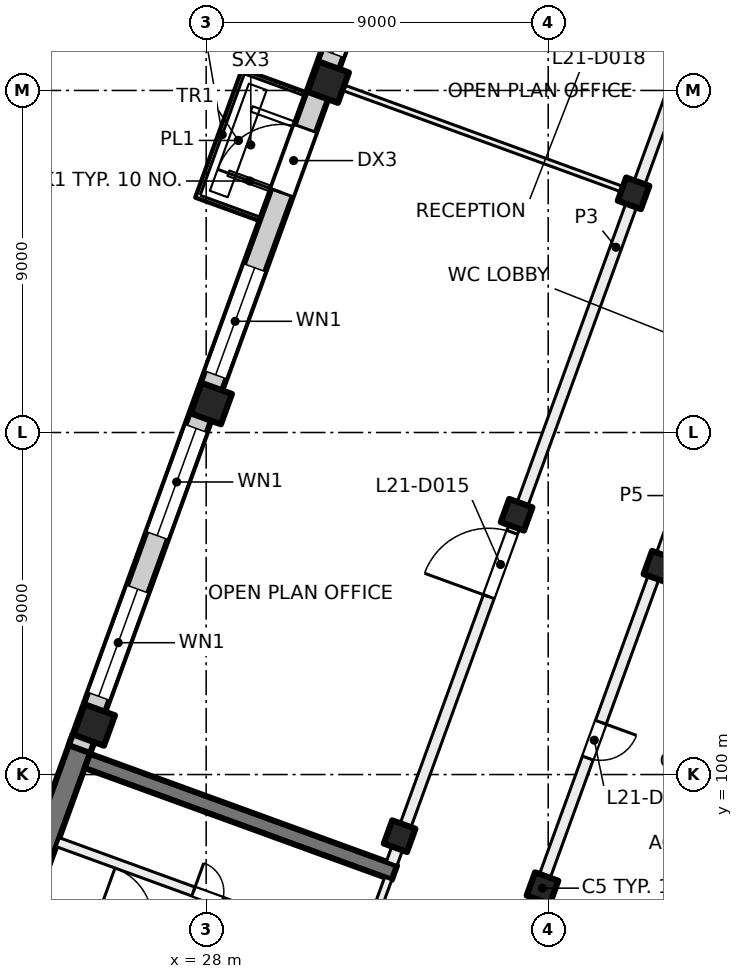
"""IFC4 building model, lengths in metres.
Left out: names, types, materials, properties, quantities, classifications, styles, units other than length and angle.
Written with IfcOpenShell. Run it as: python <this file> out.ifc"""

import sys

from ifc_helpers import new_model, si_unit, direction, frame, frame_2d, origin, origin_2d, place, context, subcontext, project, spatial, rectangle, extrude, element, fill, save


model = new_model("IFC4")
c1 = context("Model", 3, precision=1e-05, world=origin(), true_north=direction((0.0, 1.0)))
c2 = subcontext(c1, "Body", "Model", "MODEL_VIEW")
j1 = project(units=[si_unit("LENGTHUNIT", "METRE"), si_unit("PLANEANGLEUNIT", "RADIAN")], contexts=[c1])
p1 = place(None, origin())
s1 = spatial("IfcSite", under=j1, at=p1, CompositionType="ELEMENT")
p2 = place(p1, origin())
s2 = spatial("IfcBuilding", under=s1, at=p2, CompositionType="ELEMENT")
p3 = place(p2, frame((0.0, 0.0, 93.0)))
s3 = spatial("IfcBuildingStorey", under=s2, at=p3, CompositionType="ELEMENT", Elevation=93.0)
for number, where, z_axis, x_axis in (
    (1, (39.927, 105.468, 0.0), (0.0, 0.0, 1.0), (-0.342, -0.94, 0.0)),
    (2, (36.849, 97.011, 0.0), (0.0, 0.0, 1.0), (-0.342, -0.94, 0.0)),
    (3, (39.247, 115.293, 0.0), (0.0, 0.0, 1.0), (-0.342, -0.94, 0.0)),
    (4, (36.169, 106.836, 0.0), (0.0, 0.0, 1.0), (-0.342, -0.94, 0.0)),
    (5, (33.091, 98.379, 0.0), (0.0, 0.0, 1.0), (-0.342, -0.94, 0.0)),
):
    element("IfcColumn", number, at=place(p3, frame(where, z_axis=z_axis, x_axis=x_axis)), inside=s3, PredefinedType="COLUMN", context=c2, shape_type="SweptSolid", body=[
        extrude(rectangle(XDim=0.65, YDim=0.65, at=origin_2d()), origin(), (0.0, 0.0, 1.0), 4.0),
    ])
for number, where, z_axis, x_axis in (
    (6, (31.212, 118.218, 0.0), (0.0, 0.0, 1.0), (-0.342, -0.94, 0.0)),
    (7, (28.134, 109.76, 0.0), (0.0, 0.0, 1.0), (-0.342, -0.94, 0.0)),
    (8, (25.056, 101.303, 0.0), (0.0, 0.0, 1.0), (-0.342, -0.94, 0.0)),
):
    element("IfcColumn", number, at=place(p3, frame(where, z_axis=z_axis, x_axis=x_axis)), inside=s3, PredefinedType="COLUMN", context=c2, shape_type="SweptSolid", body=[
        extrude(rectangle(XDim=0.85, YDim=0.85, at=origin_2d()), origin(), (0.0, 0.0, 1.0), 4.0),
    ])
p4 = place(p3, frame((21.717, 92.568, 0.0), z_axis=(0.0, 0.0, 1.0), x_axis=(0.342017595281, 0.939693548195, 0.0)))
e9 = element("IfcWall", 9, at=p4, inside=s3, PredefinedType="SHEAR", context=c2, shape_type="SweptSolid", body=[
    extrude(rectangle(XDim=8.925, YDim=0.6, at=frame_2d((4.462, 0.0))), origin(), (0.0, 0.0, 1.0), 4.0),
])
p5 = place(p3, frame((32.953, 97.418, 0.0), z_axis=(0.0, 0.0, 1.0), x_axis=(-0.93969060187, 0.342025690201, 0.0)))
e10 = element("IfcWall", 10, at=p5, inside=s3, PredefinedType="SHEAR", context=c2, shape_type="SweptSolid", body=[
    extrude(rectangle(XDim=8.6, YDim=0.4, at=frame_2d((4.3, 0.0))), origin(), (0.0, 0.0, 1.0), 4.0),
])
p6 = place(p3, frame((24.666, 100.669, 0.0), z_axis=(0.0, 0.0, 1.0), x_axis=(0.34201964167, 0.939692803373, 0.0)))
e11 = element("IfcWall", 11, at=p6, inside=s3, PredefinedType="SOLIDWALL", context=c2, shape_type="SweptSolid", body=[
    extrude(rectangle(XDim=32.884, YDim=0.6, at=frame_2d((16.442, 0.0))), origin(), (0.0, 0.0, 1.0), 3.625),
])
p7 = place(p6, frame((1.48, 0.0, 0.9)))
e12 = element("IfcOpeningElement", 12, at=p7, cuts=e11, PredefinedType="OPENING", context=c2, shape_type="SweptSolid", body=[
    extrude(rectangle(XDim=3.0, YDim=2.4, at=frame_2d((1.5, 1.2))), frame((0.0, 0.31, 0.0), z_axis=(0.0, -1.0, 0.0), x_axis=(1.0, 0.0, 0.0)), (0.0, 0.0, 1.0), 0.62),
])
p8 = place(p6, frame((5.98, 0.0, 0.9)))
e13 = element("IfcOpeningElement", 13, at=p8, cuts=e11, PredefinedType="OPENING", context=c2, shape_type="SweptSolid", body=[
    extrude(rectangle(XDim=3.0, YDim=2.4, at=frame_2d((1.5, 1.2))), frame((0.0, 0.31, 0.0), z_axis=(0.0, -1.0, 0.0), x_axis=(1.0, 0.0, 0.0)), (0.0, 0.0, 1.0), 0.62),
])
p9 = place(p6, frame((10.48, 0.0, 0.9)))
e14 = element("IfcOpeningElement", 14, at=p9, cuts=e11, PredefinedType="OPENING", context=c2, shape_type="SweptSolid", body=[
    extrude(rectangle(XDim=3.0, YDim=2.4, at=frame_2d((1.5, 1.2))), frame((0.0, 0.31, 0.0), z_axis=(0.0, -1.0, 0.0), x_axis=(1.0, 0.0, 0.0)), (0.0, 0.0, 1.0), 0.62),
])
p10 = place(p6, frame((15.58, 0.0, 0.0)))
e15 = element("IfcOpeningElement", 15, at=p10, cuts=e11, PredefinedType="OPENING", context=c2, shape_type="SweptSolid", body=[
    extrude(rectangle(XDim=1.8, YDim=2.4, at=frame_2d((0.9, 1.2))), frame((0.0, 0.31, 0.0), z_axis=(0.0, -1.0, 0.0), x_axis=(1.0, 0.0, 0.0)), (0.0, 0.0, 1.0), 0.62),
])
p11 = place(p6, frame((19.48, 0.0, 0.9)))
e16 = element("IfcOpeningElement", 16, at=p11, cuts=e11, PredefinedType="OPENING", context=c2, shape_type="SweptSolid", body=[
    extrude(rectangle(XDim=3.0, YDim=2.4, at=frame_2d((1.5, 1.2))), frame((0.0, 0.31, 0.0), z_axis=(0.0, -1.0, 0.0), x_axis=(1.0, 0.0, 0.0)), (0.0, 0.0, 1.0), 0.62),
])
p12 = place(p6, frame((23.98, 0.0, 0.9)))
e17 = element("IfcOpeningElement", 17, at=p12, cuts=e11, PredefinedType="OPENING", context=c2, shape_type="SweptSolid", body=[
    extrude(rectangle(XDim=3.0, YDim=2.4, at=frame_2d((1.5, 1.2))), frame((0.0, 0.31, 0.0), z_axis=(0.0, -1.0, 0.0), x_axis=(1.0, 0.0, 0.0)), (0.0, 0.0, 1.0), 0.62),
])
p13 = place(p6, frame((29.08, 0.0, 0.0)))
e18 = element("IfcOpeningElement", 18, at=p13, cuts=e11, PredefinedType="OPENING", context=c2, shape_type="SweptSolid", body=[
    extrude(rectangle(XDim=1.8, YDim=2.4, at=frame_2d((0.9, 1.2))), frame((0.0, 0.31, 0.0), z_axis=(0.0, -1.0, 0.0), x_axis=(1.0, 0.0, 0.0)), (0.0, 0.0, 1.0), 0.62),
])
p14 = place(p3, frame((31.491, 93.693, 0.0), z_axis=(0.0, 0.0, 1.0), x_axis=(0.341995824804, 0.939701471648, 0.0)))
e19 = element("IfcWall", 19, at=p14, inside=s3, PredefinedType="PARTITIONING", context=c2, shape_type="SweptSolid", body=[
    extrude(rectangle(XDim=3.8, YDim=0.2, at=frame_2d((1.9, 0.0))), origin(), (0.0, 0.0, 1.0), 3.625),
])
p15 = place(p14, frame((0.3, 0.0, 0.0)))
e20 = element("IfcOpeningElement", 20, at=p15, cuts=e19, PredefinedType="OPENING", context=c2, shape_type="SweptSolid", body=[
    extrude(rectangle(XDim=1.2, YDim=2.1, at=frame_2d((0.6, 1.05))), frame((0.0, 0.11, 0.0), z_axis=(0.0, -1.0, 0.0), x_axis=(1.0, 0.0, 0.0)), (0.0, 0.0, 1.0), 0.22),
])
p16 = place(p3, frame((23.538, 96.694, 0.0), z_axis=(0.0, 0.0, 1.0), x_axis=(0.939691552312, -0.342023078919, 0.0)))
e21 = element("IfcWall", 21, at=p16, inside=s3, PredefinedType="PARTITIONING", context=c2, shape_type="SweptSolid", body=[
    extrude(rectangle(XDim=8.4, YDim=0.2, at=frame_2d((4.2, 0.0))), origin(), (0.0, 0.0, 1.0), 3.625),
])
p17 = place(p16, frame((1.65, 0.0, 0.0)))
e22 = element("IfcOpeningElement", 22, at=p17, cuts=e21, PredefinedType="OPENING", context=c2, shape_type="SweptSolid", body=[
    extrude(rectangle(XDim=1.5, YDim=2.1, at=frame_2d((0.75, 1.05))), frame((0.0, 0.11, 0.0), z_axis=(0.0, -1.0, 0.0), x_axis=(1.0, 0.0, 0.0)), (0.0, 0.0, 1.0), 0.22),
])
p18 = place(p3, frame((24.094, 98.221, 0.0), z_axis=(0.0, 0.0, 1.0), x_axis=(0.939691552312, -0.342023078919, 0.0)))
e23 = element("IfcWall", 23, at=p18, inside=s3, PredefinedType="PARTITIONING", context=c2, shape_type="SweptSolid", body=[
    extrude(rectangle(XDim=8.4, YDim=0.25, at=frame_2d((4.2, 0.0))), origin(), (0.0, 0.0, 1.0), 3.625),
])
p19 = place(p18, frame((3.8, 0.0, 0.0)))
e24 = element("IfcOpeningElement", 24, at=p19, cuts=e23, PredefinedType="OPENING", context=c2, shape_type="SweptSolid", body=[
    extrude(rectangle(XDim=0.8, YDim=2.1, at=frame_2d((0.4, 1.05))), frame((0.0, 0.135, 0.0), z_axis=(0.0, -1.0, 0.0), x_axis=(1.0, 0.0, 0.0)), (0.0, 0.0, 1.0), 0.27),
])
p20 = place(p3, frame((31.353, 118.166, 0.0), z_axis=(0.0, 0.0, 1.0), x_axis=(0.939687752599, -0.342033518263, 0.0)))
e25 = element("IfcWall", 25, at=p20, inside=s3, PredefinedType="PARTITIONING", context=c2, shape_type="SweptSolid", body=[
    extrude(rectangle(XDim=8.301, YDim=0.15, at=frame_2d((4.15, 0.0))), origin(), (0.0, 0.0, 1.0), 3.625),
])
p21 = place(p3, frame((32.881, 97.657, 0.0), z_axis=(0.0, 0.0, 1.0), x_axis=(0.342017360004, 0.939693633828, 0.0)))
e26 = element("IfcWall", 26, at=p21, inside=s3, PredefinedType="PARTITIONING", context=c2, shape_type="SweptSolid", body=[
    extrude(rectangle(XDim=34.516, YDim=0.3, at=frame_2d((17.258, 0.0))), origin(), (0.0, 0.0, 1.0), 3.625),
])
p22 = place(p21, frame((7.475, 0.0, 0.0)))
e27 = element("IfcOpeningElement", 27, at=p22, cuts=e26, PredefinedType="OPENING", context=c2, shape_type="SweptSolid", body=[
    extrude(rectangle(XDim=1.8, YDim=2.1, at=frame_2d((0.9, 1.05))), frame((0.0, 0.16, 0.0), z_axis=(0.0, -1.0, 0.0), x_axis=(1.0, 0.0, 0.0)), (0.0, 0.0, 1.0), 0.32),
])
p23 = place(p21, frame((25.0, 0.0, 0.0)))
e28 = element("IfcOpeningElement", 28, at=p23, cuts=e26, PredefinedType="OPENING", context=c2, shape_type="SweptSolid", body=[
    extrude(rectangle(XDim=1.0, YDim=2.1, at=frame_2d((0.5, 1.05))), frame((0.0, 0.16, 0.0), z_axis=(0.0, -1.0, 0.0), x_axis=(1.0, 0.0, 0.0)), (0.0, 0.0, 1.0), 0.32),
])
p24 = place(p21, frame((29.779, 0.0, 0.0)))
e29 = element("IfcOpeningElement", 29, at=p24, cuts=e26, PredefinedType="OPENING", context=c2, shape_type="SweptSolid", body=[
    extrude(rectangle(XDim=1.8, YDim=2.1, at=frame_2d((0.9, 1.05))), frame((0.0, 0.16, 0.0), z_axis=(0.0, -1.0, 0.0), x_axis=(1.0, 0.0, 0.0)), (0.0, 0.0, 1.0), 0.32),
])
p25 = place(p3, frame((40.021, 105.434, 0.0), z_axis=(0.0, 0.0, 1.0), x_axis=(0.939564838351, -0.342371018829, 0.0)))
e30 = element("IfcWall", 30, at=p25, inside=s3, PredefinedType="PARTITIONING", context=c2, shape_type="SweptSolid", body=[
    extrude(rectangle(XDim=2.591, YDim=0.125, at=frame_2d((1.295, 0.0))), origin(), (0.0, 0.0, 1.0), 3.625),
])
p26 = place(p3, frame((47.314, 125.909, 0.0), z_axis=(0.0, 0.0, 1.0), x_axis=(-0.342010770371, -0.939696032209, 0.0)))
e31 = element("IfcWall", 31, at=p26, inside=s3, PredefinedType="PARTITIONING", context=c2, shape_type="SweptSolid", body=[
    extrude(rectangle(XDim=31.485, YDim=0.3, at=frame_2d((15.742, 0.0))), origin(), (0.0, 0.0, 1.0), 3.625),
])
p27 = place(p26, frame((26.11, 0.0, 0.0)))
e32 = element("IfcOpeningElement", 32, at=p27, cuts=e31, PredefinedType="OPENING", context=c2, shape_type="SweptSolid", body=[
    extrude(rectangle(XDim=1.0, YDim=2.1, at=frame_2d((0.5, 1.05))), frame((0.0, 0.16, 0.0), z_axis=(0.0, -1.0, 0.0), x_axis=(1.0, 0.0, 0.0)), (0.0, 0.0, 1.0), 0.32),
])
p28 = place(p26, frame((15.485, 0.0, 0.0)))
e33 = element("IfcOpeningElement", 33, at=p28, cuts=e31, PredefinedType="OPENING", context=c2, shape_type="SweptSolid", body=[
    extrude(rectangle(XDim=1.0, YDim=2.1, at=frame_2d((0.5, 1.05))), frame((0.0, 0.16, 0.0), z_axis=(0.0, -1.0, 0.0), x_axis=(1.0, 0.0, 0.0)), (0.0, 0.0, 1.0), 0.32),
])
p29 = place(p26, frame((9.985, 0.0, 0.0)))
e34 = element("IfcOpeningElement", 34, at=p29, cuts=e31, PredefinedType="OPENING", context=c2, shape_type="SweptSolid", body=[
    extrude(rectangle(XDim=1.0, YDim=2.1, at=frame_2d((0.5, 1.05))), frame((0.0, 0.16, 0.0), z_axis=(0.0, -1.0, 0.0), x_axis=(1.0, 0.0, 0.0)), (0.0, 0.0, 1.0), 0.32),
])
p30 = place(p26, frame((5.484, 0.0, 0.0)))
e35 = element("IfcOpeningElement", 35, at=p30, cuts=e31, PredefinedType="OPENING", context=c2, shape_type="SweptSolid", body=[
    extrude(rectangle(XDim=1.0, YDim=2.1, at=frame_2d((0.5, 1.05))), frame((0.0, 0.16, 0.0), z_axis=(0.0, -1.0, 0.0), x_axis=(1.0, 0.0, 0.0)), (0.0, 0.0, 1.0), 0.32),
])
p31 = place(p7, origin())
e36 = element("IfcWindow", 36, at=p31, inside=s3, PartitioningType="SINGLE_PANEL", PredefinedType="WINDOW", context=c2, shape_type="SweptSolid", body=[
    extrude(rectangle(XDim=3.0, YDim=2.4, at=frame_2d((1.5, 1.2))), frame((0.0, 0.03, 0.0), z_axis=(0.0, -1.0, 0.0), x_axis=(1.0, 0.0, 0.0)), (0.0, 0.0, 1.0), 0.06),
])
fill(e12, e36)
p32 = place(p8, origin())
e37 = element("IfcWindow", 37, at=p32, inside=s3, PartitioningType="SINGLE_PANEL", PredefinedType="WINDOW", context=c2, shape_type="SweptSolid", body=[
    extrude(rectangle(XDim=3.0, YDim=2.4, at=frame_2d((1.5, 1.2))), frame((0.0, 0.03, 0.0), z_axis=(0.0, -1.0, 0.0), x_axis=(1.0, 0.0, 0.0)), (0.0, 0.0, 1.0), 0.06),
])
fill(e13, e37)
p33 = place(p9, origin())
e38 = element("IfcWindow", 38, at=p33, inside=s3, PartitioningType="SINGLE_PANEL", PredefinedType="WINDOW", context=c2, shape_type="SweptSolid", body=[
    extrude(rectangle(XDim=3.0, YDim=2.4, at=frame_2d((1.5, 1.2))), frame((0.0, 0.03, 0.0), z_axis=(0.0, -1.0, 0.0), x_axis=(1.0, 0.0, 0.0)), (0.0, 0.0, 1.0), 0.06),
])
fill(e14, e38)
p34 = place(p10, origin())
e39 = element("IfcDoor", 39, at=p34, inside=s3, OperationType="DOUBLE_DOOR_SINGLE_SWING", PredefinedType="DOOR", context=c2, shape_type="SweptSolid", body=[
    extrude(rectangle(XDim=1.8, YDim=2.4, at=frame_2d((0.9, 1.2))), frame((0.0, 0.025, 0.0), z_axis=(0.0, -1.0, 0.0), x_axis=(1.0, 0.0, 0.0)), (0.0, 0.0, 1.0), 0.05),
])
fill(e15, e39)
p35 = place(p11, origin())
e40 = element("IfcWindow", 40, at=p35, inside=s3, PartitioningType="SINGLE_PANEL", PredefinedType="WINDOW", context=c2, shape_type="SweptSolid", body=[
    extrude(rectangle(XDim=3.0, YDim=2.4, at=frame_2d((1.5, 1.2))), frame((0.0, 0.03, 0.0), z_axis=(0.0, -1.0, 0.0), x_axis=(1.0, 0.0, 0.0)), (0.0, 0.0, 1.0), 0.06),
])
fill(e16, e40)
p36 = place(p19, origin())
e41 = element("IfcDoor", 41, at=p36, inside=s3, OperationType="SINGLE_SWING_LEFT", PredefinedType="DOOR", context=c2, shape_type="SweptSolid", body=[
    extrude(rectangle(XDim=0.8, YDim=2.1, at=frame_2d((0.4, 1.05))), frame((0.0, 0.025, 0.0), z_axis=(0.0, -1.0, 0.0), x_axis=(1.0, 0.0, 0.0)), (0.0, 0.0, 1.0), 0.05),
])
fill(e24, e41)
p37 = place(p22, origin())
e42 = element("IfcDoor", 42, at=p37, inside=s3, OperationType="DOUBLE_DOOR_SINGLE_SWING", PredefinedType="DOOR", context=c2, shape_type="SweptSolid", body=[
    extrude(rectangle(XDim=1.8, YDim=2.1, at=frame_2d((0.9, 1.05))), frame((0.0, 0.025, 0.0), z_axis=(0.0, -1.0, 0.0), x_axis=(1.0, 0.0, 0.0)), (0.0, 0.0, 1.0), 0.05),
])
fill(e27, e42)
p38 = place(p27, origin())
e43 = element("IfcDoor", 43, at=p38, inside=s3, OperationType="SINGLE_SWING_RIGHT", PredefinedType="DOOR", context=c2, shape_type="SweptSolid", body=[
    extrude(rectangle(XDim=1.0, YDim=2.1, at=frame_2d((0.5, 1.05))), frame((0.0, 0.025, 0.0), z_axis=(0.0, -1.0, 0.0), x_axis=(1.0, 0.0, 0.0)), (0.0, 0.0, 1.0), 0.05),
])
fill(e32, e43)
save(model, sys.argv[1])
